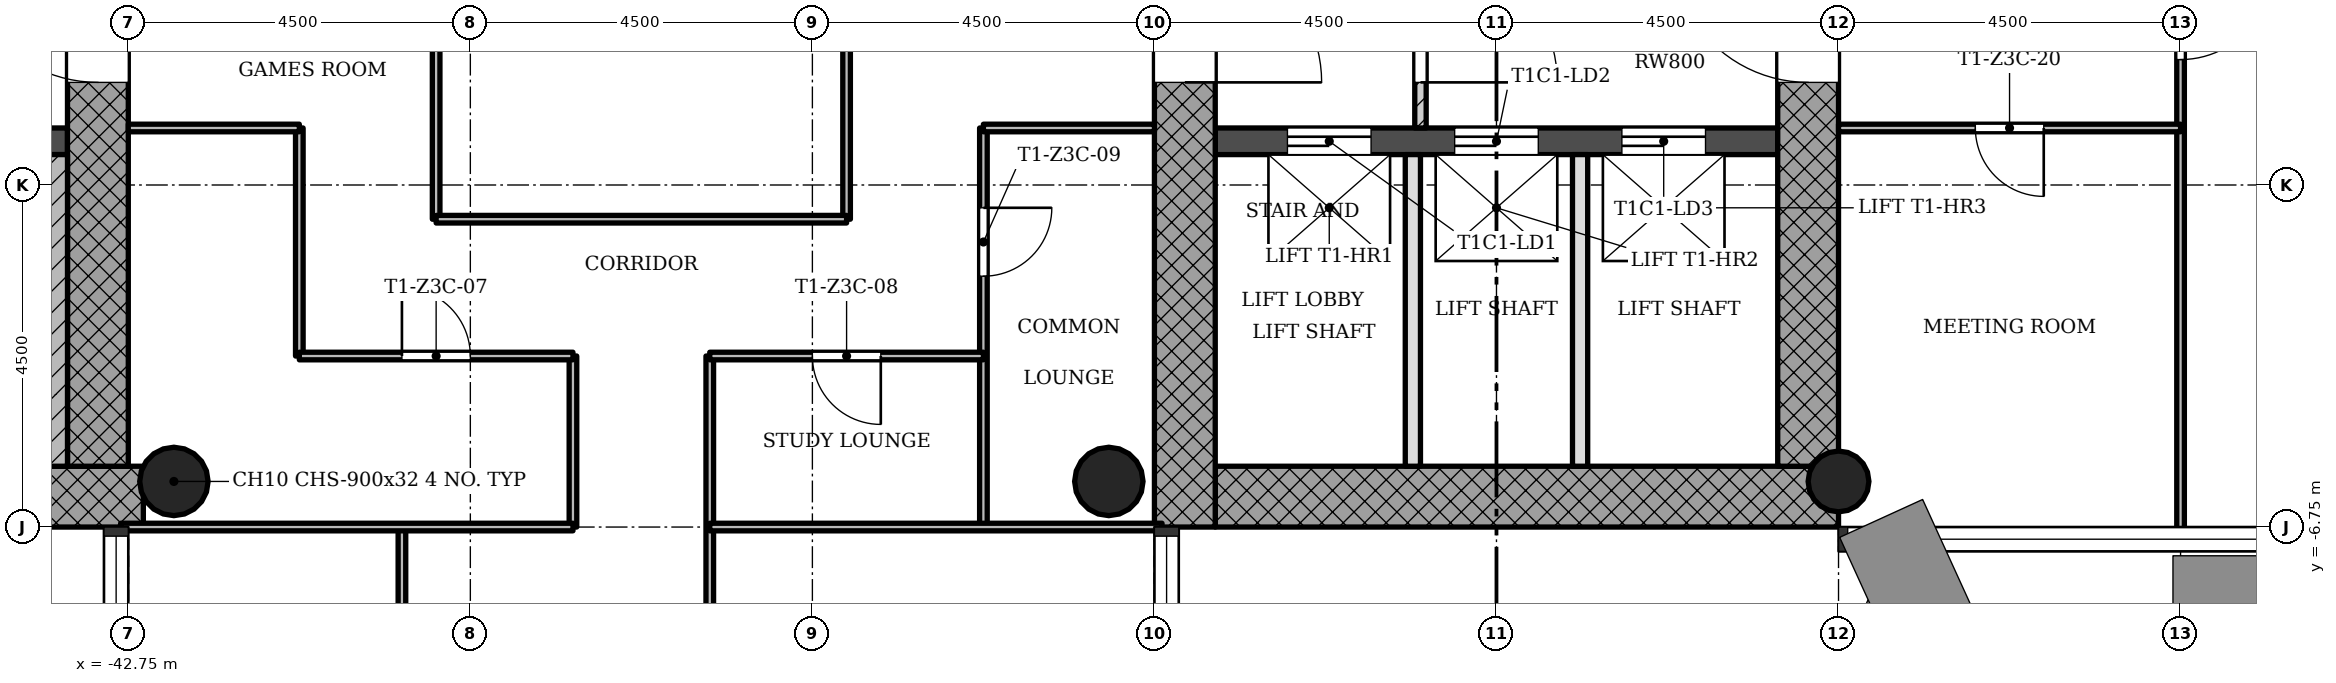
"""IFC4 building model, lengths in metres.
Left out: names, types, materials, properties, quantities, classifications, styles, units other than length and angle.
Written with IfcOpenShell. Run it as: python <this file> out.ifc"""

import sys

from ifc_helpers import new_model, si_unit, direction, frame, frame_2d, origin, origin_2d, place, context, subcontext, project, spatial, rectangle, hollow_circle, extrude, element, fill, save


model = new_model("IFC4")
c1 = context("Model", 3, precision=1e-05, world=origin(), true_north=direction((0.0, 1.0)))
c2 = subcontext(c1, "Body", "Model", "MODEL_VIEW")
j1 = project(units=[si_unit("LENGTHUNIT", "METRE"), si_unit("PLANEANGLEUNIT", "RADIAN")], contexts=[c1])
p1 = place(None, origin())
s1 = spatial("IfcSite", under=j1, at=p1, CompositionType="ELEMENT")
p2 = place(p1, origin())
s2 = spatial("IfcBuilding", under=s1, at=p2, CompositionType="ELEMENT")
p3 = place(p2, frame((0.0, 0.0, 157.5)))
s3 = spatial("IfcBuildingStorey", under=s2, at=p3, CompositionType="ELEMENT", Elevation=157.5)
p4 = place(p3, frame((-28.45, -6.35, 0.0), z_axis=(0.0, 0.0, 1.0), x_axis=(1.0, 0.0, 0.0)))
e1 = element("IfcWall", 1, at=p4, inside=s3, PredefinedType="SHEAR", context=c2, shape_type="SweptSolid", body=[
    extrude(rectangle(XDim=8.2, YDim=0.8, at=frame_2d((4.1, 0.0))), origin(), (0.0, 0.0, 1.0), 3.4),
])
p5 = place(p3, frame((-20.65, -5.95, 0.0), z_axis=(0.0, 0.0, 1.0), x_axis=(0.0, 1.0, 0.0)))
e2 = element("IfcWall", 2, at=p5, inside=s3, PredefinedType="SHEAR", context=c2, shape_type="SweptSolid", body=[
    extrude(rectangle(XDim=12.7, YDim=0.8, at=frame_2d((6.35, 0.0))), origin(), (0.0, 0.0, 1.0), 3.4),
])
p6 = place(p5, frame((5.05, 0.0, 0.0)))
e3 = element("IfcOpeningElement", 3, at=p6, cuts=e2, PredefinedType="OPENING", context=c2, shape_type="SweptSolid", body=[
    extrude(rectangle(XDim=1.8, YDim=2.1, at=frame_2d((0.9, 1.05))), frame((0.0, 0.41, 0.0), z_axis=(0.0, -1.0, 0.0), x_axis=(1.0, 0.0, 0.0)), (0.0, 0.0, 1.0), 0.82),
])
p7 = place(p3, frame((-28.85, 5.95, 0.0), z_axis=(0.0, 0.0, 1.0), x_axis=(0.0, -1.0, 0.0)))
e4 = element("IfcWall", 4, at=p7, inside=s3, PredefinedType="SHEAR", context=c2, shape_type="SweptSolid", body=[
    extrude(rectangle(XDim=12.7, YDim=0.8, at=frame_2d((6.35, 0.0))), origin(), (0.0, 0.0, 1.0), 3.4),
])
p8 = place(p7, frame((5.05, 0.0, 0.0)))
e5 = element("IfcOpeningElement", 5, at=p8, cuts=e4, PredefinedType="OPENING", context=c2, shape_type="SweptSolid", body=[
    extrude(rectangle(XDim=1.8, YDim=2.1, at=frame_2d((0.9, 1.05))), frame((0.0, 0.41, 0.0), z_axis=(0.0, -1.0, 0.0), x_axis=(1.0, 0.0, 0.0)), (0.0, 0.0, 1.0), 0.82),
])
p9 = place(p3, frame((-28.45, -1.675, 0.0), z_axis=(0.0, 0.0, 1.0), x_axis=(1.0, 0.0, 0.0)))
e6 = element("IfcWall", 6, at=p9, inside=s3, PredefinedType="SHEAR", context=c2, shape_type="SweptSolid", body=[
    extrude(rectangle(XDim=7.4, YDim=0.35, at=frame_2d((3.7, 0.0))), origin(), (0.0, 0.0, 1.0), 3.4),
])
p10 = place(p9, frame((0.95, 0.0, 0.0)))
e7 = element("IfcOpeningElement", 7, at=p10, cuts=e6, PredefinedType="OPENING", context=c2, shape_type="SweptSolid", body=[
    extrude(rectangle(XDim=1.1, YDim=2.1, at=frame_2d((0.55, 1.05))), frame((0.0, 0.185, 0.0), z_axis=(0.0, -1.0, 0.0), x_axis=(1.0, 0.0, 0.0)), (0.0, 0.0, 1.0), 0.37),
])
p11 = place(p9, frame((3.15, 0.0, 0.0)))
e8 = element("IfcOpeningElement", 8, at=p11, cuts=e6, PredefinedType="OPENING", context=c2, shape_type="SweptSolid", body=[
    extrude(rectangle(XDim=1.1, YDim=2.1, at=frame_2d((0.55, 1.05))), frame((0.0, 0.185, 0.0), z_axis=(0.0, -1.0, 0.0), x_axis=(1.0, 0.0, 0.0)), (0.0, 0.0, 1.0), 0.37),
])
p12 = place(p9, frame((5.35, 0.0, 0.0)))
e9 = element("IfcOpeningElement", 9, at=p12, cuts=e6, PredefinedType="OPENING", context=c2, shape_type="SweptSolid", body=[
    extrude(rectangle(XDim=1.1, YDim=2.1, at=frame_2d((0.55, 1.05))), frame((0.0, 0.185, 0.0), z_axis=(0.0, -1.0, 0.0), x_axis=(1.0, 0.0, 0.0)), (0.0, 0.0, 1.0), 0.37),
])
p13 = place(p3, frame((-50.95, -6.35, 0.0), z_axis=(0.0, 0.0, 1.0), x_axis=(1.0, 0.0, 0.0)))
e10 = element("IfcWall", 10, at=p13, inside=s3, PredefinedType="SHEAR", context=c2, shape_type="SweptSolid", body=[
    extrude(rectangle(XDim=8.398, YDim=0.8, at=frame_2d((4.199, 0.0))), origin(), (0.0, 0.0, 1.0), 3.4),
])
p14 = place(p3, frame((-43.15, -5.95, 0.0), z_axis=(0.0, 0.0, 1.0), x_axis=(0.0, 1.0, 0.0)))
e11 = element("IfcWall", 11, at=p14, inside=s3, PredefinedType="SHEAR", context=c2, shape_type="SweptSolid", body=[
    extrude(rectangle(XDim=12.7, YDim=0.8, at=frame_2d((6.35, 0.0))), origin(), (0.0, 0.0, 1.0), 3.4),
])
p15 = place(p14, frame((5.05, 0.0, 0.0)))
e12 = element("IfcOpeningElement", 12, at=p15, cuts=e11, PredefinedType="OPENING", context=c2, shape_type="SweptSolid", body=[
    extrude(rectangle(XDim=1.8, YDim=2.1, at=frame_2d((0.9, 1.05))), frame((0.0, 0.41, 0.0), z_axis=(0.0, -1.0, 0.0), x_axis=(1.0, 0.0, 0.0)), (0.0, 0.0, 1.0), 0.82),
])
p16 = place(p3, frame((-50.95, -1.675, 0.0), z_axis=(0.0, 0.0, 1.0), x_axis=(1.0, 0.0, 0.0)))
e13 = element("IfcWall", 13, at=p16, inside=s3, PredefinedType="SHEAR", context=c2, shape_type="SweptSolid", body=[
    extrude(rectangle(XDim=7.4, YDim=0.35, at=frame_2d((3.7, 0.0))), origin(), (0.0, 0.0, 1.0), 3.4),
])
p17 = place(p16, frame((5.65, 0.0, 0.0)))
e14 = element("IfcOpeningElement", 14, at=p17, cuts=e13, PredefinedType="OPENING", context=c2, shape_type="SweptSolid", body=[
    extrude(rectangle(XDim=0.9, YDim=2.1, at=frame_2d((0.45, 1.05))), frame((0.0, 0.185, 0.0), z_axis=(0.0, -1.0, 0.0), x_axis=(1.0, 0.0, 0.0)), (0.0, 0.0, 1.0), 0.37),
])
p18 = place(p3, frame((-20.25, -6.15, 0.0), z_axis=(0.0, 0.0, 1.0), x_axis=(1.0, 0.0, 0.0)))
e15 = element("IfcColumn", 15, at=p18, inside=s3, PredefinedType="COLUMN", context=c2, shape_type="SweptSolid", body=[
    extrude(hollow_circle(Radius=0.4, WallThickness=0.028, at=origin_2d()), origin(), (0.0, 0.0, 1.0), 3.4),
])
for number, where, z_axis, x_axis in (
    (16, (-42.15, -6.15, 0.0), (0.0, 0.0, 1.0), (1.0, 0.0, 0.0)),
    (17, (-29.85, -6.15, 0.0), (0.0, 0.0, 1.0), (1.0, 0.0, 0.0)),
):
    element("IfcColumn", number, at=place(p3, frame(where, z_axis=z_axis, x_axis=x_axis)), inside=s3, PredefinedType="COLUMN", context=c2, shape_type="SweptSolid", body=[
        extrude(hollow_circle(Radius=0.45, WallThickness=0.032, at=origin_2d()), origin(), (0.0, 0.0, 1.0), 3.4),
    ])
p19 = place(p3, frame((-25.75, -1.5, 0.0), z_axis=(0.0, 0.0, 1.0), x_axis=(0.0, 1.0, 0.0)))
e18 = element("IfcWall", 18, at=p19, inside=s3, PredefinedType="PARTITIONING", context=c2, shape_type="SweptSolid", body=[
    extrude(rectangle(XDim=3.0, YDim=0.15, at=frame_2d((1.5, 0.0))), origin(), (0.0, 0.0, 1.0), 3.0),
])
p20 = place(p19, frame((0.6, 0.0, 0.0)))
e19 = element("IfcOpeningElement", 19, at=p20, cuts=e18, PredefinedType="OPENING", context=c2, shape_type="SweptSolid", body=[
    extrude(rectangle(XDim=1.8, YDim=2.1, at=frame_2d((0.9, 1.05))), frame((0.0, 0.085, 0.0), z_axis=(0.0, -1.0, 0.0), x_axis=(1.0, 0.0, 0.0)), (0.0, 0.0, 1.0), 0.17),
])
for number, where, z_axis, x_axis in (
    (20, (-25.85, -5.95, 0.0), (0.0, 0.0, 1.0), (0.0, 1.0, 0.0)),
    (21, (-23.65, -5.95, 0.0), (0.0, 0.0, 1.0), (0.0, 1.0, 0.0)),
):
    element("IfcWall", number, at=place(p3, frame(where, z_axis=z_axis, x_axis=x_axis)), inside=s3, PredefinedType="SOLIDWALL", context=c2, shape_type="SweptSolid", body=[
        extrude(rectangle(XDim=4.1, YDim=0.2, at=frame_2d((2.05, 0.0))), origin(), (0.0, 0.0, 1.0), 3.0),
    ])
p21 = place(p3, frame((-40.5, -4.5, 0.0), z_axis=(0.0, 0.0, 1.0), x_axis=(0.0, 1.0, 0.0)))
e22 = element("IfcWall", 22, at=p21, inside=s3, PredefinedType="PARTITIONING", context=c2, shape_type="SweptSolid", body=[
    extrude(rectangle(XDim=3.0, YDim=0.1, at=frame_2d((1.5, 0.0))), origin(), (0.0, 0.0, 1.0), 3.0),
])
p22 = place(p3, frame((-39.15, -15.75, 0.0), z_axis=(0.0, 0.0, 1.0), x_axis=(0.0, 1.0, 0.0)))
e23 = element("IfcWall", 23, at=p22, inside=s3, PredefinedType="PARTITIONING", context=c2, shape_type="SweptSolid", body=[
    extrude(rectangle(XDim=9.0, YDim=0.1, at=frame_2d((4.5, 0.0))), origin(), (0.0, 0.0, 1.0), 3.0),
])
p23 = place(p22, frame((5.55, 0.0, 0.0)))
e24 = element("IfcOpeningElement", 24, at=p23, cuts=e23, PredefinedType="OPENING", context=c2, shape_type="SweptSolid", body=[
    extrude(rectangle(XDim=0.9, YDim=2.1, at=frame_2d((0.45, 1.05))), frame((0.0, 0.06, 0.0), z_axis=(0.0, -1.0, 0.0), x_axis=(1.0, 0.0, 0.0)), (0.0, 0.0, 1.0), 0.12),
])
p24 = place(p3, frame((-38.7, -2.7, 0.0), z_axis=(0.0, 0.0, 1.0), x_axis=(0.0, 1.0, 0.0)))
e25 = element("IfcWall", 25, at=p24, inside=s3, PredefinedType="PARTITIONING", context=c2, shape_type="SweptSolid", body=[
    extrude(rectangle(XDim=5.4, YDim=0.1, at=frame_2d((2.7, 0.0))), origin(), (0.0, 0.0, 1.0), 3.0),
])
p25 = place(p3, frame((-36.9, -6.75, 0.0), z_axis=(0.0, 0.0, 1.0), x_axis=(0.0, 1.0, 0.0)))
e26 = element("IfcWall", 26, at=p25, inside=s3, PredefinedType="PARTITIONING", context=c2, shape_type="SweptSolid", body=[
    extrude(rectangle(XDim=2.25, YDim=0.1, at=frame_2d((1.125, 0.0))), origin(), (0.0, 0.0, 1.0), 3.0),
])
p26 = place(p3, frame((-35.1, -8.55, 0.0), z_axis=(0.0, 0.0, 1.0), x_axis=(0.0, 1.0, 0.0)))
e27 = element("IfcWall", 27, at=p26, inside=s3, PredefinedType="PARTITIONING", context=c2, shape_type="SweptSolid", body=[
    extrude(rectangle(XDim=4.05, YDim=0.1, at=frame_2d((2.025, 0.0))), origin(), (0.0, 0.0, 1.0), 3.0),
])
p27 = place(p3, frame((-33.3, -2.7, 0.0), z_axis=(0.0, 0.0, 1.0), x_axis=(0.0, 1.0, 0.0)))
e28 = element("IfcWall", 28, at=p27, inside=s3, PredefinedType="PARTITIONING", context=c2, shape_type="SweptSolid", body=[
    extrude(rectangle(XDim=5.4, YDim=0.1, at=frame_2d((2.7, 0.0))), origin(), (0.0, 0.0, 1.0), 3.0),
])
p28 = place(p27, frame((2.25, 0.0, 0.0)))
e29 = element("IfcOpeningElement", 29, at=p28, cuts=e28, PredefinedType="OPENING", context=c2, shape_type="SweptSolid", body=[
    extrude(rectangle(XDim=0.9, YDim=2.1, at=frame_2d((0.45, 1.05))), frame((0.0, 0.06, 0.0), z_axis=(0.0, -1.0, 0.0), x_axis=(1.0, 0.0, 0.0)), (0.0, 0.0, 1.0), 0.12),
])
p29 = place(p3, frame((-31.5, -6.75, 0.0), z_axis=(0.0, 0.0, 1.0), x_axis=(0.0, 1.0, 0.0)))
e30 = element("IfcWall", 30, at=p29, inside=s3, PredefinedType="PARTITIONING", context=c2, shape_type="SweptSolid", body=[
    extrude(rectangle(XDim=5.25, YDim=0.1, at=frame_2d((2.625, 0.0))), origin(), (0.0, 0.0, 1.0), 3.0),
])
p30 = place(p29, frame((3.3, 0.0, 0.0)))
e31 = element("IfcOpeningElement", 31, at=p30, cuts=e30, PredefinedType="OPENING", context=c2, shape_type="SweptSolid", body=[
    extrude(rectangle(XDim=0.9, YDim=2.1, at=frame_2d((0.45, 1.05))), frame((0.0, 0.06, 0.0), z_axis=(0.0, -1.0, 0.0), x_axis=(1.0, 0.0, 0.0)), (0.0, 0.0, 1.0), 0.12),
])
p31 = place(p3, frame((-15.75, -6.85, 0.0), z_axis=(0.0, 0.0, 1.0), x_axis=(0.0, 1.0, 0.0)))
e32 = element("IfcWall", 32, at=p31, inside=s3, PredefinedType="PARTITIONING", context=c2, shape_type="SweptSolid", body=[
    extrude(rectangle(XDim=8.35, YDim=0.1, at=frame_2d((4.175, 0.0))), origin(), (0.0, 0.0, 1.0), 3.0),
])
p32 = place(p31, frame((6.25, 0.0, 0.0)))
e33 = element("IfcOpeningElement", 33, at=p32, cuts=e32, PredefinedType="OPENING", context=c2, shape_type="SweptSolid", body=[
    extrude(rectangle(XDim=1.2, YDim=2.1, at=frame_2d((0.6, 1.05))), frame((0.0, 0.06, 0.0), z_axis=(0.0, -1.0, 0.0), x_axis=(1.0, 0.0, 0.0)), (0.0, 0.0, 1.0), 0.12),
])
for number, where, z_axis, x_axis in (
    (34, (-42.85, -6.75, 0.0), (0.0, 0.0, 1.0), (1.0, 0.0, 0.0)),
    (35, (-35.1, -6.75, 0.0), (0.0, 0.0, 1.0), (1.0, 0.0, 0.0)),
):
    element("IfcWall", number, at=place(p3, frame(where, z_axis=z_axis, x_axis=x_axis)), inside=s3, PredefinedType="PARTITIONING", context=c2, shape_type="SweptSolid", body=[
        extrude(rectangle(XDim=5.95, YDim=0.1, at=frame_2d((2.975, 0.0))), origin(), (0.0, 0.0, 1.0), 3.0),
    ])
p33 = place(p3, frame((-40.5, -4.5, 0.0), z_axis=(0.0, 0.0, 1.0), x_axis=(1.0, 0.0, 0.0)))
e36 = element("IfcWall", 36, at=p33, inside=s3, PredefinedType="PARTITIONING", context=c2, shape_type="SweptSolid", body=[
    extrude(rectangle(XDim=3.6, YDim=0.1, at=frame_2d((1.8, 0.0))), origin(), (0.0, 0.0, 1.0), 3.0),
])
p34 = place(p33, frame((1.35, 0.0, 0.0)))
e37 = element("IfcOpeningElement", 37, at=p34, cuts=e36, PredefinedType="OPENING", context=c2, shape_type="SweptSolid", body=[
    extrude(rectangle(XDim=0.9, YDim=2.1, at=frame_2d((0.45, 1.05))), frame((0.0, 0.06, 0.0), z_axis=(0.0, -1.0, 0.0), x_axis=(1.0, 0.0, 0.0)), (0.0, 0.0, 1.0), 0.12),
])
p35 = place(p3, frame((-35.1, -4.5, 0.0), z_axis=(0.0, 0.0, 1.0), x_axis=(1.0, 0.0, 0.0)))
e38 = element("IfcWall", 38, at=p35, inside=s3, PredefinedType="PARTITIONING", context=c2, shape_type="SweptSolid", body=[
    extrude(rectangle(XDim=3.6, YDim=0.1, at=frame_2d((1.8, 0.0))), origin(), (0.0, 0.0, 1.0), 3.0),
])
p36 = place(p35, frame((1.35, 0.0, 0.0)))
e39 = element("IfcOpeningElement", 39, at=p36, cuts=e38, PredefinedType="OPENING", context=c2, shape_type="SweptSolid", body=[
    extrude(rectangle(XDim=0.9, YDim=2.1, at=frame_2d((0.45, 1.05))), frame((0.0, 0.06, 0.0), z_axis=(0.0, -1.0, 0.0), x_axis=(1.0, 0.0, 0.0)), (0.0, 0.0, 1.0), 0.12),
])
p37 = place(p3, frame((-38.7, -2.7, 0.0), z_axis=(0.0, 0.0, 1.0), x_axis=(1.0, 0.0, 0.0)))
e40 = element("IfcWall", 40, at=p37, inside=s3, PredefinedType="PARTITIONING", context=c2, shape_type="SweptSolid", body=[
    extrude(rectangle(XDim=5.4, YDim=0.1, at=frame_2d((2.7, 0.0))), origin(), (0.0, 0.0, 1.0), 3.0),
])
for number, where, z_axis, x_axis in (
    (41, (-42.75, -1.5, 0.0), (0.0, 0.0, 1.0), (1.0, 0.0, 0.0)),
    (42, (-31.5, -1.5, 0.0), (0.0, 0.0, 1.0), (1.0, 0.0, 0.0)),
):
    element("IfcWall", number, at=place(p3, frame(where, z_axis=z_axis, x_axis=x_axis)), inside=s3, PredefinedType="PARTITIONING", context=c2, shape_type="SweptSolid", body=[
        extrude(rectangle(XDim=2.25, YDim=0.1, at=frame_2d((1.125, 0.0))), origin(), (0.0, 0.0, 1.0), 3.0),
    ])
p38 = place(p3, frame((-20.25, -1.5, 0.0), z_axis=(0.0, 0.0, 1.0), x_axis=(1.0, 0.0, 0.0)))
e43 = element("IfcWall", 43, at=p38, inside=s3, PredefinedType="PARTITIONING", context=c2, shape_type="SweptSolid", body=[
    extrude(rectangle(XDim=4.5, YDim=0.1, at=frame_2d((2.25, 0.0))), origin(), (0.0, 0.0, 1.0), 3.0),
])
p39 = place(p38, frame((1.8, 0.0, 0.0)))
e44 = element("IfcOpeningElement", 44, at=p39, cuts=e43, PredefinedType="OPENING", context=c2, shape_type="SweptSolid", body=[
    extrude(rectangle(XDim=0.9, YDim=2.1, at=frame_2d((0.45, 1.05))), frame((0.0, 0.06, 0.0), z_axis=(0.0, -1.0, 0.0), x_axis=(1.0, 0.0, 0.0)), (0.0, 0.0, 1.0), 0.12),
])
p40 = place(p3, frame((-43.75, -1.85, 0.0), z_axis=(0.0, 0.0, 1.0), x_axis=(0.0, -1.0, 0.0)))
e45 = element("IfcWall", 45, at=p40, inside=s3, PredefinedType="SHEAR", context=c2, shape_type="SweptSolid", body=[
    extrude(rectangle(XDim=4.1, YDim=0.4, at=frame_2d((2.05, 0.0))), origin(), (0.0, 0.0, 1.0), 3.4),
])
p41 = place(p20, origin())
e46 = element("IfcDoor", 46, at=p41, inside=s3, OperationType="SINGLE_SWING_LEFT", PredefinedType="DOOR", context=c2, shape_type="SweptSolid", body=[
    extrude(rectangle(XDim=1.8, YDim=2.1, at=frame_2d((0.9, 1.05))), frame((0.0, 0.025, 0.0), z_axis=(0.0, -1.0, 0.0), x_axis=(1.0, 0.0, 0.0)), (0.0, 0.0, 1.0), 0.05),
])
fill(e19, e46)
p42 = place(p34, origin())
e47 = element("IfcDoor", 47, at=p42, inside=s3, OperationType="SINGLE_SWING_RIGHT", PredefinedType="DOOR", context=c2, shape_type="SweptSolid", body=[
    extrude(rectangle(XDim=0.9, YDim=2.1, at=frame_2d((0.45, 1.05))), frame((0.0, 0.025, 0.0), z_axis=(0.0, -1.0, 0.0), x_axis=(1.0, 0.0, 0.0)), (0.0, 0.0, 1.0), 0.05),
])
fill(e37, e47)
p43 = place(p36, origin())
e48 = element("IfcDoor", 48, at=p43, inside=s3, OperationType="SINGLE_SWING_RIGHT", PredefinedType="DOOR", context=c2, shape_type="SweptSolid", body=[
    extrude(rectangle(XDim=0.9, YDim=2.1, at=frame_2d((0.45, 1.05))), frame((0.0, 0.025, 0.0), z_axis=(0.0, -1.0, 0.0), x_axis=(1.0, 0.0, 0.0)), (0.0, 0.0, 1.0), 0.05),
])
fill(e39, e48)
p44 = place(p30, origin())
e49 = element("IfcDoor", 49, at=p44, inside=s3, OperationType="SINGLE_SWING_RIGHT", PredefinedType="DOOR", context=c2, shape_type="SweptSolid", body=[
    extrude(rectangle(XDim=0.9, YDim=2.1, at=frame_2d((0.45, 1.05))), frame((0.0, 0.025, 0.0), z_axis=(0.0, -1.0, 0.0), x_axis=(1.0, 0.0, 0.0)), (0.0, 0.0, 1.0), 0.05),
])
fill(e31, e49)
p45 = place(p39, origin())
e50 = element("IfcDoor", 50, at=p45, inside=s3, OperationType="SINGLE_SWING_RIGHT", PredefinedType="DOOR", context=c2, shape_type="SweptSolid", body=[
    extrude(rectangle(XDim=0.9, YDim=2.1, at=frame_2d((0.45, 1.05))), frame((0.0, 0.025, 0.0), z_axis=(0.0, -1.0, 0.0), x_axis=(1.0, 0.0, 0.0)), (0.0, 0.0, 1.0), 0.05),
])
fill(e44, e50)
p46 = place(p32, origin())
e51 = element("IfcDoor", 51, at=p46, inside=s3, OperationType="SINGLE_SWING_RIGHT", PredefinedType="DOOR", context=c2, shape_type="SweptSolid", body=[
    extrude(rectangle(XDim=1.2, YDim=2.1, at=frame_2d((0.6, 1.05))), frame((0.0, 0.025, 0.0), z_axis=(0.0, -1.0, 0.0), x_axis=(1.0, 0.0, 0.0)), (0.0, 0.0, 1.0), 0.05),
])
fill(e33, e51)
p47 = place(p10, origin())
e52 = element("IfcDoor", 52, at=p47, inside=s3, OperationType="SLIDING_TO_LEFT", PredefinedType="DOOR", context=c2, shape_type="SweptSolid", body=[
    extrude(rectangle(XDim=1.1, YDim=2.1, at=frame_2d((0.55, 1.05))), frame((0.0, 0.025, 0.0), z_axis=(0.0, -1.0, 0.0), x_axis=(1.0, 0.0, 0.0)), (0.0, 0.0, 1.0), 0.05),
])
fill(e7, e52)
p48 = place(p11, origin())
e53 = element("IfcDoor", 53, at=p48, inside=s3, OperationType="SLIDING_TO_LEFT", PredefinedType="DOOR", context=c2, shape_type="SweptSolid", body=[
    extrude(rectangle(XDim=1.1, YDim=2.1, at=frame_2d((0.55, 1.05))), frame((0.0, 0.025, 0.0), z_axis=(0.0, -1.0, 0.0), x_axis=(1.0, 0.0, 0.0)), (0.0, 0.0, 1.0), 0.05),
])
fill(e8, e53)
p49 = place(p12, origin())
e54 = element("IfcDoor", 54, at=p49, inside=s3, OperationType="SLIDING_TO_LEFT", PredefinedType="DOOR", context=c2, shape_type="SweptSolid", body=[
    extrude(rectangle(XDim=1.1, YDim=2.1, at=frame_2d((0.55, 1.05))), frame((0.0, 0.025, 0.0), z_axis=(0.0, -1.0, 0.0), x_axis=(1.0, 0.0, 0.0)), (0.0, 0.0, 1.0), 0.05),
])
fill(e9, e54)
p50 = place(p8, origin())
e55 = element("IfcDoor", 55, at=p50, inside=s3, OperationType="SINGLE_SWING_LEFT", PredefinedType="DOOR", context=c2, shape_type="SweptSolid", body=[
    extrude(rectangle(XDim=1.8, YDim=2.1, at=frame_2d((0.9, 1.05))), frame((0.0, 0.025, 0.0), z_axis=(0.0, -1.0, 0.0), x_axis=(1.0, 0.0, 0.0)), (0.0, 0.0, 1.0), 0.05),
])
fill(e5, e55)
p51 = place(p6, origin())
e56 = element("IfcDoor", 56, at=p51, inside=s3, OperationType="SINGLE_SWING_LEFT", PredefinedType="DOOR", context=c2, shape_type="SweptSolid", body=[
    extrude(rectangle(XDim=1.8, YDim=2.1, at=frame_2d((0.9, 1.05))), frame((0.0, 0.025, 0.0), z_axis=(0.0, -1.0, 0.0), x_axis=(1.0, 0.0, 0.0)), (0.0, 0.0, 1.0), 0.05),
])
fill(e3, e56)
p52 = place(p15, origin())
e57 = element("IfcDoor", 57, at=p52, inside=s3, OperationType="SINGLE_SWING_LEFT", PredefinedType="DOOR", context=c2, shape_type="SweptSolid", body=[
    extrude(rectangle(XDim=1.8, YDim=2.1, at=frame_2d((0.9, 1.05))), frame((0.0, 0.025, 0.0), z_axis=(0.0, -1.0, 0.0), x_axis=(1.0, 0.0, 0.0)), (0.0, 0.0, 1.0), 0.05),
])
fill(e12, e57)
save(model, sys.argv[1])
